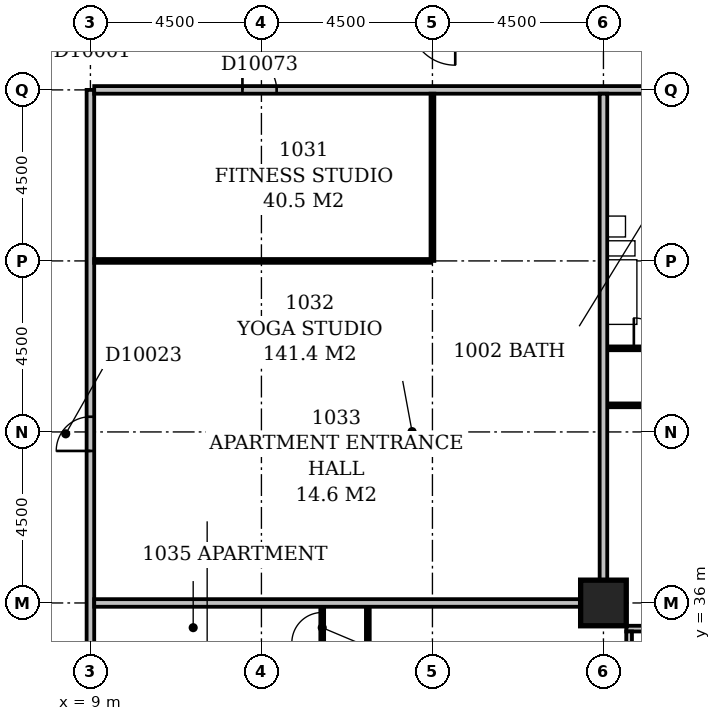
"""IFC4 building model, lengths in metres.
Left out: names, types, materials, properties, quantities, classifications, styles, units other than length and angle.
Written with IfcOpenShell. Run it as: python <this file> out.ifc"""

import sys

from ifc_helpers import new_model, si_unit, direction, frame, frame_2d, origin, origin_2d, place, context, subcontext, project, spatial, rectangle, extrude, element, fill, save


model = new_model("IFC4")
c1 = context("Model", 3, precision=1e-05, world=origin(), true_north=direction((0.0, 1.0)))
c2 = subcontext(c1, "Body", "Model", "MODEL_VIEW")
j1 = project(units=[si_unit("LENGTHUNIT", "METRE"), si_unit("PLANEANGLEUNIT", "RADIAN")], contexts=[c1])
p1 = place(None, origin())
s1 = spatial("IfcSite", under=j1, at=p1, CompositionType="ELEMENT")
p2 = place(p1, origin())
s2 = spatial("IfcBuilding", under=s1, at=p2, CompositionType="ELEMENT")
p3 = place(p2, frame((0.0, 0.0, 47.0)))
s3 = spatial("IfcBuildingStorey", under=s2, at=p3, CompositionType="ELEMENT", Elevation=47.0)
p4 = place(p3, frame((22.5, 36.0, -0.3), z_axis=(0.0, 0.0, 1.0), x_axis=(1.0, 0.0, 0.0)))
e1 = element("IfcColumn", 1, at=p4, inside=s3, PredefinedType="COLUMN", context=c2, shape_type="SweptSolid", body=[
    extrude(rectangle(XDim=1.2, YDim=1.2, at=origin_2d()), origin(), (0.0, 0.0, 1.0), 3.6),
])
p5 = place(p3, frame((23.175, 17.4, 0.0), z_axis=(0.0, 0.0, 1.0), x_axis=(0.0, 1.0, 0.0)))
e2 = element("IfcWall", 2, at=p5, inside=s3, PredefinedType="STANDARD", context=c2, shape_type="SweptSolid", body=[
    extrude(rectangle(XDim=17.85, YDim=0.15, at=frame_2d((8.925, 0.0))), origin(), (0.0, 0.0, 1.0), 2.7),
])
p6 = place(p5, frame((3.03, 0.0, 0.6)))
e3 = element("IfcOpeningElement", 3, at=p6, cuts=e2, PredefinedType="OPENING", context=c2, shape_type="SweptSolid", body=[
    extrude(rectangle(XDim=1.2, YDim=1.8, at=frame_2d((0.6, 0.9))), frame((0.0, 0.087, 0.0), z_axis=(0.0, -1.0, 0.0), x_axis=(1.0, 0.0, 0.0)), (0.0, 0.0, 1.0), 0.174),
])
p7 = place(p5, frame((6.15, 0.0, 0.6)))
e4 = element("IfcOpeningElement", 4, at=p7, cuts=e2, PredefinedType="OPENING", context=c2, shape_type="SweptSolid", body=[
    extrude(rectangle(XDim=2.4, YDim=1.8, at=frame_2d((1.2, 0.9))), frame((0.0, 0.087, 0.0), z_axis=(0.0, -1.0, 0.0), x_axis=(1.0, 0.0, 0.0)), (0.0, 0.0, 1.0), 0.174),
])
p8 = place(p5, frame((10.65, 0.0, 0.6)))
e5 = element("IfcOpeningElement", 5, at=p8, cuts=e2, PredefinedType="OPENING", context=c2, shape_type="SweptSolid", body=[
    extrude(rectangle(XDim=2.4, YDim=1.8, at=frame_2d((1.2, 0.9))), frame((0.0, 0.087, 0.0), z_axis=(0.0, -1.0, 0.0), x_axis=(1.0, 0.0, 0.0)), (0.0, 0.0, 1.0), 0.174),
])
p9 = place(p5, frame((14.992, 0.0, 0.6)))
e6 = element("IfcOpeningElement", 6, at=p9, cuts=e2, PredefinedType="OPENING", context=c2, shape_type="SweptSolid", body=[
    extrude(rectangle(XDim=2.1, YDim=1.8, at=frame_2d((1.05, 0.9))), frame((0.0, 0.087, 0.0), z_axis=(0.0, -1.0, 0.0), x_axis=(1.0, 0.0, 0.0)), (0.0, 0.0, 1.0), 0.174),
])
p10 = place(p3, frame((23.1, 35.325, 0.0), z_axis=(0.0, 0.0, 1.0), x_axis=(1.0, 0.0, 0.0)))
e7 = element("IfcWall", 7, at=p10, inside=s3, PredefinedType="STANDARD", context=c2, shape_type="SweptSolid", body=[
    extrude(rectangle(XDim=45.15, YDim=0.15, at=frame_2d((22.575, 0.0))), origin(), (0.0, 0.0, 1.0), 2.7),
])
p11 = place(p10, frame((2.386, 0.0, 0.6)))
e8 = element("IfcOpeningElement", 8, at=p11, cuts=e7, PredefinedType="OPENING", context=c2, shape_type="SweptSolid", body=[
    extrude(rectangle(XDim=0.6, YDim=1.8, at=frame_2d((0.3, 0.9))), frame((0.0, 0.087, 0.0), z_axis=(0.0, -1.0, 0.0), x_axis=(1.0, 0.0, 0.0)), (0.0, 0.0, 1.0), 0.174),
])
p12 = place(p10, frame((4.95, 0.0, 0.6)))
e9 = element("IfcOpeningElement", 9, at=p12, cuts=e7, PredefinedType="OPENING", context=c2, shape_type="SweptSolid", body=[
    extrude(rectangle(XDim=2.4, YDim=1.8, at=frame_2d((1.2, 0.9))), frame((0.0, 0.087, 0.0), z_axis=(0.0, -1.0, 0.0), x_axis=(1.0, 0.0, 0.0)), (0.0, 0.0, 1.0), 0.174),
])
p13 = place(p10, frame((9.45, 0.0, 0.6)))
e10 = element("IfcOpeningElement", 10, at=p13, cuts=e7, PredefinedType="OPENING", context=c2, shape_type="SweptSolid", body=[
    extrude(rectangle(XDim=2.4, YDim=1.8, at=frame_2d((1.2, 0.9))), frame((0.0, 0.087, 0.0), z_axis=(0.0, -1.0, 0.0), x_axis=(1.0, 0.0, 0.0)), (0.0, 0.0, 1.0), 0.174),
])
p14 = place(p10, frame((13.95, 0.0, 0.6)))
e11 = element("IfcOpeningElement", 11, at=p14, cuts=e7, PredefinedType="OPENING", context=c2, shape_type="SweptSolid", body=[
    extrude(rectangle(XDim=2.4, YDim=1.8, at=frame_2d((1.2, 0.9))), frame((0.0, 0.087, 0.0), z_axis=(0.0, -1.0, 0.0), x_axis=(1.0, 0.0, 0.0)), (0.0, 0.0, 1.0), 0.174),
])
p15 = place(p10, frame((18.45, 0.0, 0.6)))
e12 = element("IfcOpeningElement", 12, at=p15, cuts=e7, PredefinedType="OPENING", context=c2, shape_type="SweptSolid", body=[
    extrude(rectangle(XDim=2.4, YDim=1.8, at=frame_2d((1.2, 0.9))), frame((0.0, 0.087, 0.0), z_axis=(0.0, -1.0, 0.0), x_axis=(1.0, 0.0, 0.0)), (0.0, 0.0, 1.0), 0.174),
])
p16 = place(p10, frame((22.83, 0.0, 0.6)))
e13 = element("IfcOpeningElement", 13, at=p16, cuts=e7, PredefinedType="OPENING", context=c2, shape_type="SweptSolid", body=[
    extrude(rectangle(XDim=1.5, YDim=1.8, at=frame_2d((0.75, 0.9))), frame((0.0, 0.087, 0.0), z_axis=(0.0, -1.0, 0.0), x_axis=(1.0, 0.0, 0.0)), (0.0, 0.0, 1.0), 0.174),
])
p17 = place(p10, frame((28.894, 0.0, 0.6)))
e14 = element("IfcOpeningElement", 14, at=p17, cuts=e7, PredefinedType="OPENING", context=c2, shape_type="SweptSolid", body=[
    extrude(rectangle(XDim=1.2, YDim=1.8, at=frame_2d((0.6, 0.9))), frame((0.0, 0.087, 0.0), z_axis=(0.0, -1.0, 0.0), x_axis=(1.0, 0.0, 0.0)), (0.0, 0.0, 1.0), 0.174),
])
p18 = place(p10, frame((31.95, 0.0, 0.6)))
e15 = element("IfcOpeningElement", 15, at=p18, cuts=e7, PredefinedType="OPENING", context=c2, shape_type="SweptSolid", body=[
    extrude(rectangle(XDim=2.4, YDim=1.8, at=frame_2d((1.2, 0.9))), frame((0.0, 0.087, 0.0), z_axis=(0.0, -1.0, 0.0), x_axis=(1.0, 0.0, 0.0)), (0.0, 0.0, 1.0), 0.174),
])
p19 = place(p10, frame((36.45, 0.0, 0.6)))
e16 = element("IfcOpeningElement", 16, at=p19, cuts=e7, PredefinedType="OPENING", context=c2, shape_type="SweptSolid", body=[
    extrude(rectangle(XDim=2.4, YDim=1.8, at=frame_2d((1.2, 0.9))), frame((0.0, 0.087, 0.0), z_axis=(0.0, -1.0, 0.0), x_axis=(1.0, 0.0, 0.0)), (0.0, 0.0, 1.0), 0.174),
])
p20 = place(p10, frame((40.95, 0.0, 0.6)))
e17 = element("IfcOpeningElement", 17, at=p20, cuts=e7, PredefinedType="OPENING", context=c2, shape_type="SweptSolid", body=[
    extrude(rectangle(XDim=2.4, YDim=1.8, at=frame_2d((1.2, 0.9))), frame((0.0, 0.087, 0.0), z_axis=(0.0, -1.0, 0.0), x_axis=(1.0, 0.0, 0.0)), (0.0, 0.0, 1.0), 0.174),
])
p21 = place(p3, frame((9.0, 5.0, 0.0), z_axis=(0.0, 0.0, 1.0), x_axis=(0.0, 1.0, 0.0)))
e18 = element("IfcWall", 18, at=p21, inside=s3, PredefinedType="PARTITIONING", context=c2, shape_type="SweptSolid", body=[
    extrude(rectangle(XDim=44.5, YDim=0.2, at=frame_2d((22.25, 0.0))), origin(), (0.0, 0.0, 1.0), 3.3),
])
p22 = place(p21, frame((28.45, 0.0, 0.0)))
e19 = element("IfcOpeningElement", 19, at=p22, cuts=e18, PredefinedType="OPENING", context=c2, shape_type="SweptSolid", body=[
    extrude(rectangle(XDim=1.0, YDim=2.1, at=frame_2d((0.5, 1.05))), frame((0.0, 0.112, 0.0), z_axis=(0.0, -1.0, 0.0), x_axis=(1.0, 0.0, 0.0)), (0.0, 0.0, 1.0), 0.224),
])
p23 = place(p21, frame((17.8, 0.0, 0.0)))
e20 = element("IfcOpeningElement", 20, at=p23, cuts=e18, PredefinedType="OPENING", context=c2, shape_type="SweptSolid", body=[
    extrude(rectangle(XDim=1.0, YDim=2.1, at=frame_2d((0.5, 1.05))), frame((0.0, 0.112, 0.0), z_axis=(0.0, -1.0, 0.0), x_axis=(1.0, 0.0, 0.0)), (0.0, 0.0, 1.0), 0.224),
])
p24 = place(p21, frame((14.55, 0.0, 0.0)))
e21 = element("IfcOpeningElement", 21, at=p24, cuts=e18, PredefinedType="OPENING", context=c2, shape_type="SweptSolid", body=[
    extrude(rectangle(XDim=1.0, YDim=2.1, at=frame_2d((0.5, 1.05))), frame((0.0, 0.112, 0.0), z_axis=(0.0, -1.0, 0.0), x_axis=(1.0, 0.0, 0.0)), (0.0, 0.0, 1.0), 0.224),
])
p25 = place(p21, frame((11.7, 0.0, 0.0)))
e22 = element("IfcOpeningElement", 22, at=p25, cuts=e18, PredefinedType="OPENING", context=c2, shape_type="SweptSolid", body=[
    extrude(rectangle(XDim=1.0, YDim=2.1, at=frame_2d((0.5, 1.05))), frame((0.0, 0.112, 0.0), z_axis=(0.0, -1.0, 0.0), x_axis=(1.0, 0.0, 0.0)), (0.0, 0.0, 1.0), 0.224),
])
p26 = place(p21, frame((35.0, 0.0, 0.0)))
e23 = element("IfcOpeningElement", 23, at=p26, cuts=e18, PredefinedType="OPENING", context=c2, shape_type="SweptSolid", body=[
    extrude(rectangle(XDim=0.9, YDim=2.1, at=frame_2d((0.45, 1.05))), frame((0.0, 0.112, 0.0), z_axis=(0.0, -1.0, 0.0), x_axis=(1.0, 0.0, 0.0)), (0.0, 0.0, 1.0), 0.224),
])
p27 = place(p21, frame((1.5, 0.0, 0.0)))
e24 = element("IfcOpeningElement", 24, at=p27, cuts=e18, PredefinedType="OPENING", context=c2, shape_type="SweptSolid", body=[
    extrude(rectangle(XDim=0.9, YDim=2.1, at=frame_2d((0.45, 1.05))), frame((0.0, 0.112, 0.0), z_axis=(0.0, -1.0, 0.0), x_axis=(1.0, 0.0, 0.0)), (0.0, 0.0, 1.0), 0.224),
])
p28 = place(p3, frame((16.3, 31.6, 0.0), z_axis=(0.0, 0.0, 1.0), x_axis=(0.0, 1.0, 0.0)))
e25 = element("IfcWall", 25, at=p28, inside=s3, PredefinedType="PARTITIONING", context=c2, shape_type="SweptSolid", body=[
    extrude(rectangle(XDim=4.3, YDim=0.1, at=frame_2d((2.15, 0.0))), origin(), (0.0, 0.0, 1.0), 3.3),
])
p29 = place(p28, frame((1.7, 0.0, 0.0)))
e26 = element("IfcOpeningElement", 26, at=p29, cuts=e25, PredefinedType="OPENING", context=c2, shape_type="SweptSolid", body=[
    extrude(rectangle(XDim=0.9, YDim=2.1, at=frame_2d((0.45, 1.05))), frame((0.0, 0.062, 0.0), z_axis=(0.0, -1.0, 0.0), x_axis=(1.0, 0.0, 0.0)), (0.0, 0.0, 1.0), 0.124),
])
p30 = place(p3, frame((15.1, 34.7, 0.0), z_axis=(0.0, 0.0, 1.0), x_axis=(0.0, 1.0, 0.0)))
e27 = element("IfcWall", 27, at=p30, inside=s3, PredefinedType="PARTITIONING", context=c2, shape_type="SweptSolid", body=[
    extrude(rectangle(XDim=1.2, YDim=0.1, at=frame_2d((0.6, 0.0))), origin(), (0.0, 0.0, 1.0), 3.3),
])
p31 = place(p30, frame((0.25, 0.0, 0.0)))
e28 = element("IfcOpeningElement", 28, at=p31, cuts=e27, PredefinedType="OPENING", context=c2, shape_type="SweptSolid", body=[
    extrude(rectangle(XDim=0.8, YDim=2.1, at=frame_2d((0.4, 1.05))), frame((0.0, 0.062, 0.0), z_axis=(0.0, -1.0, 0.0), x_axis=(1.0, 0.0, 0.0)), (0.0, 0.0, 1.0), 0.124),
])
p32 = place(p3, frame((9.1, 36.0, 0.0), z_axis=(0.0, 0.0, 1.0), x_axis=(1.0, 0.0, 0.0)))
e29 = element("IfcWall", 29, at=p32, inside=s3, PredefinedType="PARTITIONING", context=c2, shape_type="SweptSolid", body=[
    extrude(rectangle(XDim=12.8, YDim=0.2, at=frame_2d((6.4, 0.0))), origin(), (0.0, 0.0, 1.0), 2.4),
])
p33 = place(p3, frame((22.5, 36.6, 0.0), z_axis=(0.0, 0.0, 1.0), x_axis=(0.0, 1.0, 0.0)))
e30 = element("IfcWall", 30, at=p33, inside=s3, PredefinedType="PARTITIONING", context=c2, shape_type="SweptSolid", body=[
    extrude(rectangle(XDim=12.8, YDim=0.2, at=frame_2d((6.4, 0.0))), origin(), (0.0, 0.0, 1.0), 3.3),
])
p34 = place(p3, frame((22.6, 41.2, 0.0), z_axis=(0.0, 0.0, 1.0), x_axis=(1.0, 0.0, 0.0)))
e31 = element("IfcWall", 31, at=p34, inside=s3, PredefinedType="PARTITIONING", context=c2, shape_type="SweptSolid", body=[
    extrude(rectangle(XDim=17.8, YDim=0.1, at=frame_2d((8.9, 0.0))), origin(), (0.0, 0.0, 1.0), 3.3),
])
p35 = place(p34, frame((1.7, 0.0, 0.0)))
e32 = element("IfcOpeningElement", 32, at=p35, cuts=e31, PredefinedType="OPENING", context=c2, shape_type="SweptSolid", body=[
    extrude(rectangle(XDim=0.9, YDim=2.1, at=frame_2d((0.45, 1.05))), frame((0.0, 0.062, 0.0), z_axis=(0.0, -1.0, 0.0), x_axis=(1.0, 0.0, 0.0)), (0.0, 0.0, 1.0), 0.124),
])
p36 = place(p34, frame((6.2, 0.0, 0.0)))
e33 = element("IfcOpeningElement", 33, at=p36, cuts=e31, PredefinedType="OPENING", context=c2, shape_type="SweptSolid", body=[
    extrude(rectangle(XDim=0.9, YDim=2.1, at=frame_2d((0.45, 1.05))), frame((0.0, 0.062, 0.0), z_axis=(0.0, -1.0, 0.0), x_axis=(1.0, 0.0, 0.0)), (0.0, 0.0, 1.0), 0.124),
])
p37 = place(p34, frame((11.85, 0.0, 0.0)))
e34 = element("IfcOpeningElement", 34, at=p37, cuts=e31, PredefinedType="OPENING", context=c2, shape_type="SweptSolid", body=[
    extrude(rectangle(XDim=0.9, YDim=2.1, at=frame_2d((0.45, 1.05))), frame((0.0, 0.062, 0.0), z_axis=(0.0, -1.0, 0.0), x_axis=(1.0, 0.0, 0.0)), (0.0, 0.0, 1.0), 0.124),
])
p38 = place(p34, frame((15.2, 0.0, 0.0)))
e35 = element("IfcOpeningElement", 35, at=p38, cuts=e31, PredefinedType="OPENING", context=c2, shape_type="SweptSolid", body=[
    extrude(rectangle(XDim=0.9, YDim=2.1, at=frame_2d((0.45, 1.05))), frame((0.0, 0.062, 0.0), z_axis=(0.0, -1.0, 0.0), x_axis=(1.0, 0.0, 0.0)), (0.0, 0.0, 1.0), 0.124),
])
p39 = place(p3, frame((22.6, 42.7, 0.0), z_axis=(0.0, 0.0, 1.0), x_axis=(1.0, 0.0, 0.0)))
e36 = element("IfcWall", 36, at=p39, inside=s3, PredefinedType="PARTITIONING", context=c2, shape_type="SweptSolid", body=[
    extrude(rectangle(XDim=2.25, YDim=0.1, at=frame_2d((1.125, 0.0))), origin(), (0.0, 0.0, 1.0), 3.3),
])
p40 = place(p39, frame((0.7, 0.0, 0.0)))
e37 = element("IfcOpeningElement", 37, at=p40, cuts=e36, PredefinedType="OPENING", context=c2, shape_type="SweptSolid", body=[
    extrude(rectangle(XDim=0.8, YDim=2.1, at=frame_2d((0.4, 1.05))), frame((0.0, 0.062, 0.0), z_axis=(0.0, -1.0, 0.0), x_axis=(1.0, 0.0, 0.0)), (0.0, 0.0, 1.0), 0.124),
])
p41 = place(p3, frame((9.1, 45.0, 0.0), z_axis=(0.0, 0.0, 1.0), x_axis=(1.0, 0.0, 0.0)))
e38 = element("IfcWall", 38, at=p41, inside=s3, PredefinedType="PARTITIONING", context=c2, shape_type="SweptSolid", body=[
    extrude(rectangle(XDim=8.85, YDim=0.1, at=frame_2d((4.425, 0.0))), origin(), (0.0, 0.0, 1.0), 3.3),
])
p42 = place(p3, frame((18.0, 45.0, 0.0), z_axis=(0.0, 0.0, 1.0), x_axis=(0.0, 1.0, 0.0)))
e39 = element("IfcWall", 39, at=p42, inside=s3, PredefinedType="PARTITIONING", context=c2, shape_type="SweptSolid", body=[
    extrude(rectangle(XDim=4.4, YDim=0.1, at=frame_2d((2.2, 0.0))), origin(), (0.0, 0.0, 1.0), 3.3),
])
p43 = place(p3, frame((9.1, 49.5, 0.0), z_axis=(0.0, 0.0, 1.0), x_axis=(1.0, 0.0, 0.0)))
e40 = element("IfcWall", 40, at=p43, inside=s3, PredefinedType="PARTITIONING", context=c2, shape_type="SweptSolid", body=[
    extrude(rectangle(XDim=57.8, YDim=0.2, at=frame_2d((28.9, 0.0))), origin(), (0.0, 0.0, 1.0), 3.3),
])
p44 = place(p43, frame((16.1, 0.0, 0.0)))
e41 = element("IfcOpeningElement", 41, at=p44, cuts=e40, PredefinedType="OPENING", context=c2, shape_type="SweptSolid", body=[
    extrude(rectangle(XDim=1.0, YDim=2.1, at=frame_2d((0.5, 1.05))), frame((0.0, 0.112, 0.0), z_axis=(0.0, -1.0, 0.0), x_axis=(1.0, 0.0, 0.0)), (0.0, 0.0, 1.0), 0.224),
])
p45 = place(p43, frame((40.0, 0.0, 0.0)))
e42 = element("IfcOpeningElement", 42, at=p45, cuts=e40, PredefinedType="OPENING", context=c2, shape_type="SweptSolid", body=[
    extrude(rectangle(XDim=1.0, YDim=2.1, at=frame_2d((0.5, 1.05))), frame((0.0, 0.112, 0.0), z_axis=(0.0, -1.0, 0.0), x_axis=(1.0, 0.0, 0.0)), (0.0, 0.0, 1.0), 0.224),
])
p46 = place(p43, frame((45.2, 0.0, 0.0)))
e43 = element("IfcOpeningElement", 43, at=p46, cuts=e40, PredefinedType="OPENING", context=c2, shape_type="SweptSolid", body=[
    extrude(rectangle(XDim=1.0, YDim=2.1, at=frame_2d((0.5, 1.05))), frame((0.0, 0.112, 0.0), z_axis=(0.0, -1.0, 0.0), x_axis=(1.0, 0.0, 0.0)), (0.0, 0.0, 1.0), 0.224),
])
p47 = place(p43, frame((3.9, 0.0, 0.0)))
e44 = element("IfcOpeningElement", 44, at=p47, cuts=e40, PredefinedType="OPENING", context=c2, shape_type="SweptSolid", body=[
    extrude(rectangle(XDim=0.9, YDim=2.1, at=frame_2d((0.45, 1.05))), frame((0.0, 0.112, 0.0), z_axis=(0.0, -1.0, 0.0), x_axis=(1.0, 0.0, 0.0)), (0.0, 0.0, 1.0), 0.224),
])
p48 = place(p26, origin())
e45 = element("IfcDoor", 45, at=p48, inside=s3, OperationType="SINGLE_SWING_LEFT", PredefinedType="DOOR", context=c2, shape_type="SweptSolid", body=[
    extrude(rectangle(XDim=0.9, YDim=2.1, at=frame_2d((0.45, 1.05))), frame((0.0, 0.025, 0.0), z_axis=(0.0, -1.0, 0.0), x_axis=(1.0, 0.0, 0.0)), (0.0, 0.0, 1.0), 0.05),
])
fill(e23, e45)
p49 = place(p31, origin())
e46 = element("IfcDoor", 46, at=p49, inside=s3, OperationType="SINGLE_SWING_LEFT", PredefinedType="DOOR", context=c2, shape_type="SweptSolid", body=[
    extrude(rectangle(XDim=0.8, YDim=2.1, at=frame_2d((0.4, 1.05))), frame((0.0, 0.025, 0.0), z_axis=(0.0, -1.0, 0.0), x_axis=(1.0, 0.0, 0.0)), (0.0, 0.0, 1.0), 0.05),
])
fill(e28, e46)
p50 = place(p40, origin())
e47 = element("IfcDoor", 47, at=p50, inside=s3, OperationType="SINGLE_SWING_LEFT", PredefinedType="DOOR", context=c2, shape_type="SweptSolid", body=[
    extrude(rectangle(XDim=0.8, YDim=2.1, at=frame_2d((0.4, 1.05))), frame((0.0, 0.025, 0.0), z_axis=(0.0, -1.0, 0.0), x_axis=(1.0, 0.0, 0.0)), (0.0, 0.0, 1.0), 0.05),
])
fill(e37, e47)
p51 = place(p47, origin())
e48 = element("IfcDoor", 48, at=p51, inside=s3, OperationType="SINGLE_SWING_LEFT", PredefinedType="DOOR", context=c2, shape_type="SweptSolid", body=[
    extrude(rectangle(XDim=0.9, YDim=2.1, at=frame_2d((0.45, 1.05))), frame((0.0, 0.025, 0.0), z_axis=(0.0, -1.0, 0.0), x_axis=(1.0, 0.0, 0.0)), (0.0, 0.0, 1.0), 0.05),
])
fill(e44, e48)
save(model, sys.argv[1])
